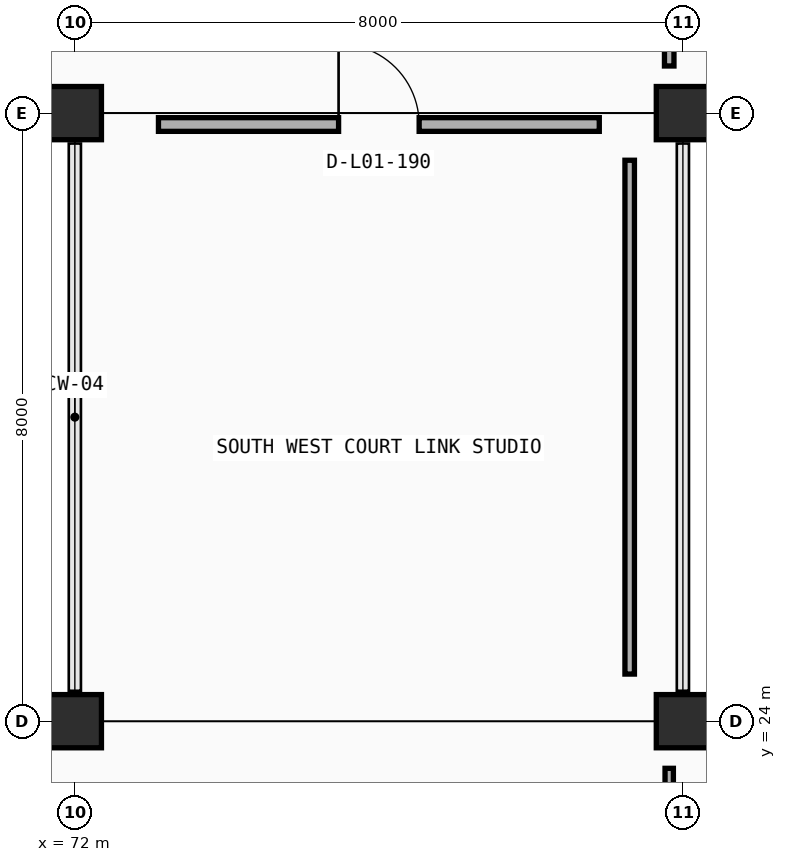
"""IFC4 building model, lengths in metres.
Left out: names, types, materials, properties, quantities, classifications, styles, units other than length and angle.
Written with IfcOpenShell. Run it as: python <this file> out.ifc"""

import sys

from ifc_helpers import new_model, si_unit, direction, frame, frame_2d, origin, origin_2d, place, context, subcontext, project, spatial, rectangle, extrude, element, fill, save


model = new_model("IFC4")
c1 = context("Model", 3, precision=1e-05, world=origin(), true_north=direction((0.0, 1.0)))
c2 = subcontext(c1, "Body", "Model", "MODEL_VIEW")
j1 = project(units=[si_unit("LENGTHUNIT", "METRE"), si_unit("PLANEANGLEUNIT", "RADIAN")], contexts=[c1])
p1 = place(None, origin())
s1 = spatial("IfcSite", under=j1, at=p1, CompositionType="ELEMENT")
p2 = place(p1, origin())
s2 = spatial("IfcBuilding", under=s1, at=p2, CompositionType="ELEMENT")
p3 = place(p2, origin())
s3 = spatial("IfcBuildingStorey", under=s2, at=p3, CompositionType="ELEMENT", Elevation=0.0)
for number, where, z_axis, x_axis in (
    (1, (72.0, 24.0, 0.0), (0.0, 0.0, 1.0), (1.0, 0.0, 0.0)),
    (2, (80.0, 24.0, 0.0), (0.0, 0.0, 1.0), (1.0, 0.0, 0.0)),
    (3, (72.0, 32.0, 0.0), (0.0, 0.0, 1.0), (1.0, 0.0, 0.0)),
    (4, (80.0, 32.0, 0.0), (0.0, 0.0, 1.0), (1.0, 0.0, 0.0)),
):
    element("IfcColumn", number, at=place(p3, frame(where, z_axis=z_axis, x_axis=x_axis)), inside=s3, PredefinedType="COLUMN", context=c2, shape_type="SweptSolid", body=[
        extrude(rectangle(XDim=0.7, YDim=0.7, at=origin_2d()), origin(), (0.0, 0.0, 1.0), 4.8),
    ])
p4 = place(p3, frame((79.82, 19.67, 0.0), z_axis=(0.0, 0.0, 1.0), x_axis=(0.0, 1.0, 0.0)))
e5 = element("IfcWall", 5, at=p4, inside=s3, PredefinedType="MOVABLE", context=c2, shape_type="SweptSolid", body=[
    extrude(rectangle(XDim=3.71, YDim=0.11, at=frame_2d((1.855, 0.0))), origin(), (0.0, 0.0, 1.0), 3.76),
])
p5 = place(p3, frame((79.82, 32.62, 0.0), z_axis=(0.0, 0.0, 1.0), x_axis=(0.0, 1.0, 0.0)))
e6 = element("IfcWall", 6, at=p5, inside=s3, PredefinedType="PARTITIONING", context=c2, shape_type="SweptSolid", body=[
    extrude(rectangle(XDim=6.81, YDim=0.125, at=frame_2d((3.405, 0.0))), origin(), (0.0, 0.0, 1.0), 3.76),
])
p6 = place(p3, frame((73.1, 31.85, 0.0), z_axis=(0.0, 0.0, 1.0), x_axis=(1.0, 0.0, 0.0)))
e7 = element("IfcWall", 7, at=p6, inside=s3, PredefinedType="PARTITIONING", context=c2, shape_type="SweptSolid", body=[
    extrude(rectangle(XDim=5.8, YDim=0.18, at=frame_2d((2.9, 0.0))), origin(), (0.0, 0.0, 1.0), 3.9),
])
p7 = place(p6, frame((2.37, 0.0, 0.0)))
e8 = element("IfcOpeningElement", 8, at=p7, cuts=e7, PredefinedType="OPENING", context=c2, shape_type="SweptSolid", body=[
    extrude(rectangle(XDim=1.06, YDim=2.1, at=frame_2d((0.53, 1.05))), frame((0.0, 0.1, 0.0), z_axis=(0.0, -1.0, 0.0), x_axis=(1.0, 0.0, 0.0)), (0.0, 0.0, 1.0), 0.2),
])
p8 = place(p3, frame((79.3, 24.62, 0.0), z_axis=(0.0, 0.0, 1.0), x_axis=(0.0, 1.0, 0.0)))
e9 = element("IfcWall", 9, at=p8, inside=s3, PredefinedType="PARTITIONING", context=c2, shape_type="SweptSolid", body=[
    extrude(rectangle(XDim=6.76, YDim=0.125, at=frame_2d((3.38, 0.0))), origin(), (0.0, 0.0, 1.0), 3.9),
])
p9 = place(p7, origin())
e10 = element("IfcDoor", 10, at=p9, inside=s3, OperationType="SINGLE_SWING_LEFT", PredefinedType="DOOR", context=c2, shape_type="SweptSolid", body=[
    extrude(rectangle(XDim=1.06, YDim=2.1, at=frame_2d((0.53, 1.05))), frame((0.0, 0.025, 0.0), z_axis=(0.0, -1.0, 0.0), x_axis=(1.0, 0.0, 0.0)), (0.0, 0.0, 1.0), 0.05),
])
fill(e8, e10)
save(model, sys.argv[1])
